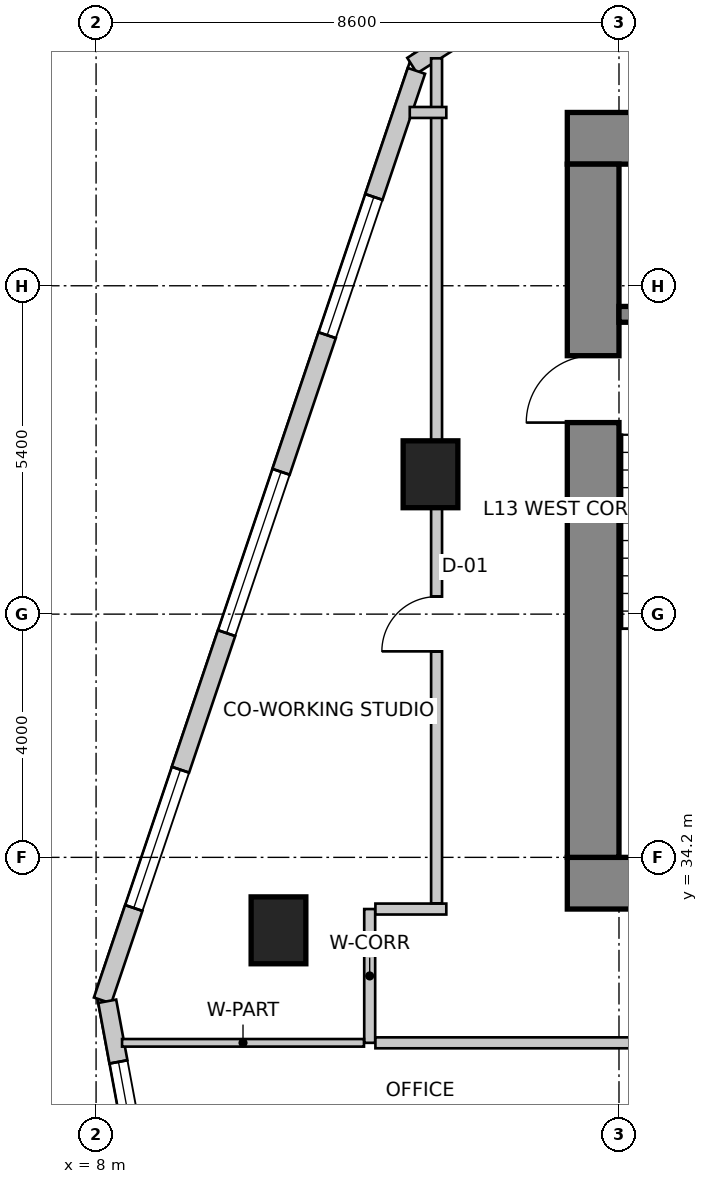
"""IFC4 building model, lengths in metres.
Left out: names, types, materials, properties, quantities, classifications, styles, units other than length and angle.
Written with IfcOpenShell. Run it as: python <this file> out.ifc"""

import sys

from ifc_helpers import new_model, si_unit, direction, frame, frame_2d, origin, origin_2d, place, context, subcontext, project, spatial, rectangle, extrude, source, transform, mapped, element, fill, save


model = new_model("IFC4")
c1 = context("Model", 3, precision=1e-05, world=origin(), true_north=direction((0.0, 1.0)))
c2 = subcontext(c1, "Body", "Model", "MODEL_VIEW")
j1 = project(units=[si_unit("LENGTHUNIT", "METRE"), si_unit("PLANEANGLEUNIT", "RADIAN")], contexts=[c1])
p1 = place(None, origin())
s1 = spatial("IfcSite", under=j1, at=p1, CompositionType="ELEMENT")
p2 = place(p1, origin())
s2 = spatial("IfcBuilding", under=s1, at=p2, CompositionType="ELEMENT")
p3 = place(p2, frame((0.0, 0.0, 55.0)))
s3 = spatial("IfcBuildingStorey", under=s2, at=p3, CompositionType="ELEMENT", Elevation=55.0)
p4 = place(p3, frame((15.75, 46.025, 0.0), z_axis=(0.0, 0.0, 1.0), x_axis=(1.0, 0.0, 0.0)))
e1 = element("IfcWall", 1, at=p4, inside=s3, PredefinedType="SHEAR", context=c2, shape_type="SweptSolid", body=[
    extrude(rectangle(XDim=16.1, YDim=0.85, at=frame_2d((8.05, 0.0))), origin(), (0.0, 0.0, 1.0), 4.0),
])
p5 = place(p3, frame((15.75, 33.775, 0.0), z_axis=(0.0, 0.0, 1.0), x_axis=(1.0, 0.0, 0.0)))
e2 = element("IfcWall", 2, at=p5, inside=s3, PredefinedType="SHEAR", context=c2, shape_type="SweptSolid", body=[
    extrude(rectangle(XDim=16.1, YDim=0.85, at=frame_2d((8.05, 0.0))), origin(), (0.0, 0.0, 1.0), 4.0),
])
m1 = source(origin(), c2, "Body", "SweptSolid", [
    extrude(rectangle(XDim=1.3, YDim=2.15, at=frame_2d((0.65, 1.075))), frame((0.0, 0.435, 0.0), z_axis=(0.0, -1.0, 0.0), x_axis=(1.0, 0.0, 0.0)), (0.0, 0.0, 1.0), 0.87),
])
p6 = place(p5, frame((10.18, 0.0, 0.0)))
e3 = element("IfcOpeningElement", 3, at=p6, cuts=e2, PredefinedType="OPENING", context=c2, shape_type="MappedRepresentation", body=[
    mapped(m1, transform((0.0, 0.0, 0.0), scale=1.0)),
])
p7 = place(p3, frame((16.175, 34.2, 0.0), z_axis=(0.0, 0.0, 1.0), x_axis=(0.0, 1.0, 0.0)))
e4 = element("IfcWall", 4, at=p7, inside=s3, PredefinedType="SHEAR", context=c2, shape_type="SweptSolid", body=[
    extrude(rectangle(XDim=11.4, YDim=0.85, at=frame_2d((5.7, 0.0))), origin(), (0.0, 0.0, 1.0), 4.0),
])
m2 = source(origin(), c2, "Body", "SweptSolid", [
    extrude(rectangle(XDim=1.1, YDim=2.15, at=frame_2d((0.55, 1.075))), frame((0.0, 0.435, 0.0), z_axis=(0.0, -1.0, 0.0), x_axis=(1.0, 0.0, 0.0)), (0.0, 0.0, 1.0), 0.87),
])
p8 = place(p7, frame((7.15, 0.0, 0.0)))
e5 = element("IfcOpeningElement", 5, at=p8, cuts=e4, PredefinedType="OPENING", context=c2, shape_type="MappedRepresentation", body=[
    mapped(m2, transform((0.0, 0.0, 0.0), scale=1.0)),
])
p9 = place(p3, frame((16.6, 43.13, 0.0), z_axis=(0.0, 0.0, 1.0), x_axis=(1.0, 0.0, 0.0)))
e6 = element("IfcWall", 6, at=p9, inside=s3, PredefinedType="SHEAR", context=c2, shape_type="SweptSolid", body=[
    extrude(rectangle(XDim=3.5, YDim=0.26, at=frame_2d((1.75, 0.0))), origin(), (0.0, 0.0, 1.0), 4.0),
])
m3 = source(origin(), c2, "Body", "SweptSolid", [
    extrude(rectangle(XDim=0.9, YDim=1.1, at=origin_2d()), origin(), (0.0, 0.0, 1.0), 4.0),
])
for number, where, z_axis, x_axis in (
    (7, (11.0, 33.0, 0.0), (0.0, 0.0, 1.0), (1.0, 0.0, 0.0)),
    (8, (13.5, 40.5, 0.0), (0.0, 0.0, 1.0), (1.0, 0.0, 0.0)),
):
    element("IfcColumn", number, at=place(p3, frame(where, z_axis=z_axis, x_axis=x_axis)), inside=s3, PredefinedType="COLUMN", context=c2, shape_type="MappedRepresentation", body=[
        mapped(m3, transform((0.0, 0.0, 0.0), scale=1.0)),
    ])
p10 = place(p3, frame((21.875, 52.743, 0.0), z_axis=(0.0, 0.0, 1.0), x_axis=(-0.843647802826, -0.536896996441, 0.0)))
e9 = element("IfcWall", 9, at=p10, inside=s3, PredefinedType="SOLIDWALL", context=c2, shape_type="SweptSolid", body=[
    extrude(rectangle(XDim=10.284, YDim=0.3, at=frame_2d((5.142, 0.0))), origin(), (0.0, 0.0, 1.0), 3.75),
])
m4 = source(origin(), c2, "Body", "SweptSolid", [
    extrude(rectangle(XDim=1.2, YDim=1.6, at=frame_2d((0.6, 0.8))), frame((0.0, 0.16, 0.0), z_axis=(0.0, -1.0, 0.0), x_axis=(1.0, 0.0, 0.0)), (0.0, 0.0, 1.0), 0.32),
])
p11 = place(p10, frame((0.479, 0.0, 0.85)))
e10 = element("IfcOpeningElement", 10, at=p11, cuts=e9, PredefinedType="OPENING", context=c2, shape_type="MappedRepresentation", body=[
    mapped(m4, transform((0.0, 0.0, 0.0), scale=1.0)),
])
m5 = source(origin(), c2, "Body", "SweptSolid", [
    extrude(rectangle(XDim=2.8, YDim=2.4, at=frame_2d((1.4, 1.2))), frame((0.0, 0.16, 0.0), z_axis=(0.0, -1.0, 0.0), x_axis=(1.0, 0.0, 0.0)), (0.0, 0.0, 1.0), 0.32),
])
p12 = place(p10, frame((3.342, 0.0, 0.85)))
e11 = element("IfcOpeningElement", 11, at=p12, cuts=e9, PredefinedType="OPENING", context=c2, shape_type="MappedRepresentation", body=[
    mapped(m5, transform((0.0, 0.0, 0.0), scale=1.0)),
])
m6 = source(origin(), c2, "Body", "SweptSolid", [
    extrude(rectangle(XDim=1.8, YDim=2.1, at=frame_2d((0.9, 1.05))), frame((0.0, 0.16, 0.0), z_axis=(0.0, -1.0, 0.0), x_axis=(1.0, 0.0, 0.0)), (0.0, 0.0, 1.0), 0.32),
])
p13 = place(p10, frame((7.754, 0.0, 0.85)))
e12 = element("IfcOpeningElement", 12, at=p13, cuts=e9, PredefinedType="OPENING", context=c2, shape_type="MappedRepresentation", body=[
    mapped(m6, transform((0.0, 0.0, 0.0), scale=1.0)),
])
p14 = place(p3, frame((13.269, 47.134, 0.0), z_axis=(0.0, 0.0, 1.0), x_axis=(-0.319920423265, -0.947444416722, 0.0)))
e13 = element("IfcWall", 13, at=p14, inside=s3, PredefinedType="SOLIDWALL", context=c2, shape_type="SweptSolid", body=[
    extrude(rectangle(XDim=16.135, YDim=0.3, at=frame_2d((8.067, 0.0))), origin(), (0.0, 0.0, 1.0), 3.75),
])
m7 = source(origin(), c2, "Body", "SweptSolid", [
    extrude(rectangle(XDim=2.4, YDim=2.2, at=frame_2d((1.2, 1.1))), frame((0.0, 0.16, 0.0), z_axis=(0.0, -1.0, 0.0), x_axis=(1.0, 0.0, 0.0)), (0.0, 0.0, 1.0), 0.32),
])
p15 = place(p14, frame((2.188, 0.0, 0.85)))
e14 = element("IfcOpeningElement", 14, at=p15, cuts=e13, PredefinedType="OPENING", context=c2, shape_type="MappedRepresentation", body=[
    mapped(m7, transform((0.0, 0.0, 0.0), scale=1.0)),
])
p16 = place(p14, frame((6.959, 0.0, 0.85)))
e15 = element("IfcOpeningElement", 15, at=p16, cuts=e13, PredefinedType="OPENING", context=c2, shape_type="MappedRepresentation", body=[
    mapped(m5, transform((0.0, 0.0, 0.0), scale=1.0)),
])
p17 = place(p14, frame((12.13, 0.0, 0.85)))
e16 = element("IfcOpeningElement", 16, at=p17, cuts=e13, PredefinedType="OPENING", context=c2, shape_type="MappedRepresentation", body=[
    mapped(m7, transform((0.0, 0.0, 0.0), scale=1.0)),
])
p18 = place(p3, frame((8.183, 31.833, 0.0), z_axis=(0.0, 0.0, 1.0), x_axis=(0.18216364648, -0.983268226834, 0.0)))
e17 = element("IfcWall", 17, at=p18, inside=s3, PredefinedType="SOLIDWALL", context=c2, shape_type="SweptSolid", body=[
    extrude(rectangle(XDim=26.678, YDim=0.3, at=frame_2d((13.339, 0.0))), origin(), (0.0, 0.0, 1.0), 3.75),
])
m8 = source(origin(), c2, "Body", "SweptSolid", [
    extrude(rectangle(XDim=2.1, YDim=2.0, at=frame_2d((1.05, 1.0))), frame((0.0, 0.16, 0.0), z_axis=(0.0, -1.0, 0.0), x_axis=(1.0, 0.0, 0.0)), (0.0, 0.0, 1.0), 0.32),
])
p19 = place(p18, frame((1.014, 0.0, 0.85)))
e18 = element("IfcOpeningElement", 18, at=p19, cuts=e17, PredefinedType="OPENING", context=c2, shape_type="MappedRepresentation", body=[
    mapped(m8, transform((0.0, 0.0, 0.0), scale=1.0)),
])
p20 = place(p18, frame((4.3, 0.0, 0.85)))
e19 = element("IfcOpeningElement", 19, at=p20, cuts=e17, PredefinedType="OPENING", context=c2, shape_type="MappedRepresentation", body=[
    mapped(m5, transform((0.0, 0.0, 0.0), scale=1.0)),
])
p21 = place(p18, frame((8.876, 0.0, 0.85)))
e20 = element("IfcOpeningElement", 20, at=p21, cuts=e17, PredefinedType="OPENING", context=c2, shape_type="MappedRepresentation", body=[
    mapped(m5, transform((0.0, 0.0, 0.0), scale=1.0)),
])
p22 = place(p18, frame((13.453, 0.0, 0.85)))
e21 = element("IfcOpeningElement", 21, at=p22, cuts=e17, PredefinedType="OPENING", context=c2, shape_type="MappedRepresentation", body=[
    mapped(m5, transform((0.0, 0.0, 0.0), scale=1.0)),
])
p23 = place(p18, frame((18.211, 0.0, 0.85)))
e22 = element("IfcOpeningElement", 22, at=p23, cuts=e17, PredefinedType="OPENING", context=c2, shape_type="MappedRepresentation", body=[
    mapped(m5, transform((0.0, 0.0, 0.0), scale=1.0)),
])
p24 = place(p18, frame((22.909, 0.0, 0.85)))
e23 = element("IfcOpeningElement", 23, at=p24, cuts=e17, PredefinedType="OPENING", context=c2, shape_type="MappedRepresentation", body=[
    mapped(m7, transform((0.0, 0.0, 0.0), scale=1.0)),
])
p25 = place(p3, frame((12.5, 31.15, 0.0), z_axis=(0.0, 0.0, 1.0), x_axis=(0.0, 1.0, 0.0)))
e24 = element("IfcWall", 24, at=p25, inside=s3, PredefinedType="PARTITIONING", context=c2, shape_type="SweptSolid", body=[
    extrude(rectangle(XDim=2.2, YDim=0.18, at=frame_2d((1.1, 0.0))), origin(), (0.0, 0.0, 1.0), 3.419),
])
p26 = place(p3, frame((12.594, 33.35, 0.0), z_axis=(0.0, 0.0, 1.0), x_axis=(1.0, 0.0, 0.0)))
e25 = element("IfcWall", 25, at=p26, inside=s3, PredefinedType="PARTITIONING", context=c2, shape_type="SweptSolid", body=[
    extrude(rectangle(XDim=1.166, YDim=0.18, at=frame_2d((0.583, 0.0))), origin(), (0.0, 0.0, 1.0), 3.75),
])
p27 = place(p3, frame((17.96, 31.15, 0.0), z_axis=(0.0, 0.0, 1.0), x_axis=(-1.0, 0.0, 0.0)))
e26 = element("IfcWall", 26, at=p27, inside=s3, PredefinedType="PARTITIONING", context=c2, shape_type="SweptSolid", body=[
    extrude(rectangle(XDim=5.366, YDim=0.18, at=frame_2d((2.683, 0.0))), origin(), (0.0, 0.0, 1.0), 3.419),
])
p28 = place(p3, frame((13.6, 33.444, 0.0), z_axis=(0.0, 0.0, 1.0), x_axis=(0.0, 1.0, 0.0)))
e27 = element("IfcWall", 27, at=p28, inside=s3, PredefinedType="PARTITIONING", context=c2, shape_type="SweptSolid", body=[
    extrude(rectangle(XDim=13.896, YDim=0.18, at=frame_2d((6.948, 0.0))), origin(), (0.0, 0.0, 1.0), 2.892),
])
m9 = source(origin(), c2, "Body", "SweptSolid", [
    extrude(rectangle(XDim=0.9, YDim=2.15, at=frame_2d((0.45, 1.075))), frame((0.0, 0.1, 0.0), z_axis=(0.0, -1.0, 0.0), x_axis=(1.0, 0.0, 0.0)), (0.0, 0.0, 1.0), 0.2),
])
p29 = place(p28, frame((4.144, 0.0, 0.0)))
e28 = element("IfcOpeningElement", 28, at=p29, cuts=e27, PredefinedType="OPENING", context=c2, shape_type="MappedRepresentation", body=[
    mapped(m9, transform((0.0, 0.0, 0.0), scale=1.0)),
])
p30 = place(p3, frame((13.76, 46.45, 0.0), z_axis=(0.0, 0.0, 1.0), x_axis=(-1.0, 0.0, 0.0)))
e29 = element("IfcWall", 29, at=p30, inside=s3, PredefinedType="PARTITIONING", context=c2, shape_type="SweptSolid", body=[
    extrude(rectangle(XDim=0.601, YDim=0.18, at=frame_2d((0.301, 0.0))), origin(), (0.0, 0.0, 1.0), 3.75),
])
p31 = place(p3, frame((12.406, 31.15, 0.0), z_axis=(0.0, 0.0, 1.0), x_axis=(-1.0, 0.0, 0.0)))
e30 = element("IfcWall", 30, at=p31, inside=s3, PredefinedType="PARTITIONING", context=c2, shape_type="SweptSolid", body=[
    extrude(rectangle(XDim=3.979, YDim=0.125, at=frame_2d((1.99, 0.0))), origin(), (0.0, 0.0, 1.0), 2.892),
])
m10 = source(origin(), c2, "Body", "SweptSolid", [
    extrude(rectangle(XDim=2.4, YDim=2.2, at=frame_2d((1.2, 1.1))), frame((0.0, -0.015, 0.0), z_axis=(0.0, -1.0, 0.0), x_axis=(1.0, 0.0, 0.0)), (0.0, 0.0, 1.0), 0.06),
])
p32 = place(p15, origin())
e31 = element("IfcWindow", 31, at=p32, inside=s3, PartitioningType="SINGLE_PANEL", PredefinedType="WINDOW", context=c2, shape_type="MappedRepresentation", body=[
    mapped(m10, transform((0.0, 0.0, 0.0), scale=1.0)),
])
fill(e14, e31)
m11 = source(origin(), c2, "Body", "SweptSolid", [
    extrude(rectangle(XDim=2.8, YDim=2.4, at=frame_2d((1.4, 1.2))), frame((0.0, -0.015, 0.0), z_axis=(0.0, -1.0, 0.0), x_axis=(1.0, 0.0, 0.0)), (0.0, 0.0, 1.0), 0.06),
])
p33 = place(p16, origin())
e32 = element("IfcWindow", 32, at=p33, inside=s3, PartitioningType="SINGLE_PANEL", PredefinedType="WINDOW", context=c2, shape_type="MappedRepresentation", body=[
    mapped(m11, transform((0.0, 0.0, 0.0), scale=1.0)),
])
fill(e15, e32)
p34 = place(p17, origin())
e33 = element("IfcWindow", 33, at=p34, inside=s3, PartitioningType="SINGLE_PANEL", PredefinedType="WINDOW", context=c2, shape_type="MappedRepresentation", body=[
    mapped(m10, transform((0.0, 0.0, 0.0), scale=1.0)),
])
fill(e16, e33)
m12 = source(origin(), c2, "Body", "SweptSolid", [
    extrude(rectangle(XDim=2.1, YDim=2.0, at=frame_2d((1.05, 1.0))), frame((0.0, -0.015, 0.0), z_axis=(0.0, -1.0, 0.0), x_axis=(1.0, 0.0, 0.0)), (0.0, 0.0, 1.0), 0.06),
])
p35 = place(p19, origin())
e34 = element("IfcWindow", 34, at=p35, inside=s3, PartitioningType="SINGLE_PANEL", PredefinedType="WINDOW", context=c2, shape_type="MappedRepresentation", body=[
    mapped(m12, transform((0.0, 0.0, 0.0), scale=1.0)),
])
fill(e18, e34)
m13 = source(origin(), c2, "Body", "SweptSolid", [
    extrude(rectangle(XDim=1.1, YDim=2.15, at=frame_2d((0.55, 1.075))), frame((0.0, 0.025, 0.0), z_axis=(0.0, -1.0, 0.0), x_axis=(1.0, 0.0, 0.0)), (0.0, 0.0, 1.0), 0.05),
])
p36 = place(p8, origin())
e35 = element("IfcDoor", 35, at=p36, inside=s3, OperationType="SINGLE_SWING_LEFT", PredefinedType="DOOR", context=c2, shape_type="MappedRepresentation", body=[
    mapped(m13, transform((0.0, 0.0, 0.0), scale=1.0)),
])
fill(e5, e35)
m14 = source(origin(), c2, "Body", "SweptSolid", [
    extrude(rectangle(XDim=0.9, YDim=2.15, at=frame_2d((0.45, 1.075))), frame((0.0, 0.025, 0.0), z_axis=(0.0, -1.0, 0.0), x_axis=(1.0, 0.0, 0.0)), (0.0, 0.0, 1.0), 0.05),
])
p37 = place(p29, origin())
e36 = element("IfcDoor", 36, at=p37, inside=s3, OperationType="SINGLE_SWING_LEFT", PredefinedType="DOOR", context=c2, shape_type="MappedRepresentation", body=[
    mapped(m14, transform((0.0, 0.0, 0.0), scale=1.0)),
])
fill(e28, e36)
save(model, sys.argv[1])
